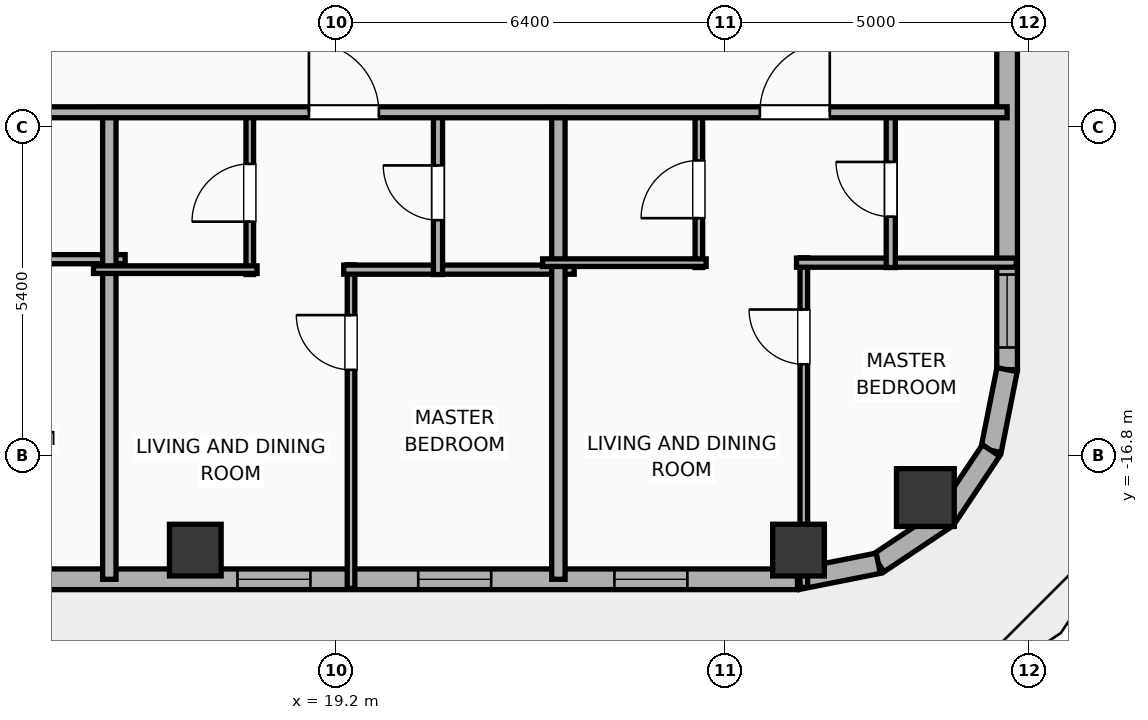
"""IFC4 building model, lengths in metres.
Left out: names, types, materials, properties, quantities, classifications, styles, units other than length and angle.
Written with IfcOpenShell. Run it as: python <this file> out.ifc"""

import sys

from ifc_helpers import new_model, si_unit, direction, frame, frame_2d, origin, origin_2d, place, context, subcontext, project, spatial, rectangle, hollow_rectangle, hollow_circle, extrude, element, fill, save


model = new_model("IFC4")
c1 = context("Model", 3, precision=1e-05, world=origin(), true_north=direction((0.0, 1.0)))
c2 = subcontext(c1, "Body", "Model", "MODEL_VIEW")
j1 = project(units=[si_unit("LENGTHUNIT", "METRE"), si_unit("PLANEANGLEUNIT", "RADIAN")], contexts=[c1])
p1 = place(None, origin())
s1 = spatial("IfcSite", under=j1, at=p1, CompositionType="ELEMENT")
p2 = place(p1, origin())
s2 = spatial("IfcBuilding", under=s1, at=p2, CompositionType="ELEMENT")
p3 = place(p2, frame((0.0, 0.0, 231.4)))
s3 = spatial("IfcBuildingStorey", under=s2, at=p3, CompositionType="ELEMENT", Elevation=231.4)
for number, where, z_axis, x_axis in (
    (1, (16.88, -18.35, 0.0), (0.0, 0.0, 1.0), (1.0, 0.0, 0.0)),
    (2, (26.8, -18.35, 0.0), (0.0, 0.0, 1.0), (1.0, 0.0, 0.0)),
):
    element("IfcColumn", number, at=place(p3, frame(where, z_axis=z_axis, x_axis=x_axis)), inside=s3, PredefinedType="COLUMN", context=c2, shape_type="SweptSolid", body=[
        extrude(hollow_rectangle(XDim=0.85, YDim=0.85, WallThickness=0.028, at=origin_2d()), origin(), (0.0, 0.0, 1.0), 3.9),
    ])
p4 = place(p3, frame((28.886, -17.486, 0.0), z_axis=(0.0, 0.0, 1.0), x_axis=(1.0, 0.0, 0.0)))
e3 = element("IfcColumn", 3, at=p4, inside=s3, PredefinedType="COLUMN", context=c2, shape_type="SweptSolid", body=[
    extrude(hollow_circle(Radius=0.475, WallThickness=0.032, at=origin_2d()), origin(), (0.0, 0.0, 1.0), 3.9),
])
p5 = place(p3, frame((26.783, -18.83, 0.0), z_axis=(0.0, 0.0, 1.0), x_axis=(-1.0, 0.0, 0.0)))
e4 = element("IfcWall", 4, at=p5, inside=s3, PredefinedType="ELEMENTEDWALL", context=c2, shape_type="SweptSolid", body=[
    extrude(rectangle(XDim=49.566, YDim=0.34, at=frame_2d((24.783, 0.0))), origin(), (0.0, 0.0, 1.0), 3.65),
])
p6 = place(p5, frame((23.583, 0.0, 0.75)))
e5 = element("IfcOpeningElement", 5, at=p6, cuts=e4, PredefinedType="OPENING", context=c2, shape_type="SweptSolid", body=[
    extrude(rectangle(XDim=2.4, YDim=2.1, at=frame_2d((1.2, 1.05))), frame((0.0, 0.18, 0.0), z_axis=(0.0, -1.0, 0.0), x_axis=(1.0, 0.0, 0.0)), (0.0, 0.0, 1.0), 0.36),
])
p7 = place(p5, frame((41.756, 0.0, 0.75)))
e6 = element("IfcOpeningElement", 6, at=p7, cuts=e4, PredefinedType="OPENING", context=c2, shape_type="SweptSolid", body=[
    extrude(rectangle(XDim=2.4, YDim=2.1, at=frame_2d((1.2, 1.05))), frame((0.0, 0.18, 0.0), z_axis=(0.0, -1.0, 0.0), x_axis=(1.0, 0.0, 0.0)), (0.0, 0.0, 1.0), 0.36),
])
p8 = place(p5, frame((47.222, 0.0, 0.75)))
e7 = element("IfcOpeningElement", 7, at=p8, cuts=e4, PredefinedType="OPENING", context=c2, shape_type="SweptSolid", body=[
    extrude(rectangle(XDim=1.2, YDim=2.05, at=frame_2d((0.6, 1.025))), frame((0.0, 0.18, 0.0), z_axis=(0.0, -1.0, 0.0), x_axis=(1.0, 0.0, 0.0)), (0.0, 0.0, 1.0), 0.36),
])
p9 = place(p5, frame((45.263, 0.0, 0.75)))
e8 = element("IfcOpeningElement", 8, at=p9, cuts=e4, PredefinedType="OPENING", context=c2, shape_type="SweptSolid", body=[
    extrude(rectangle(XDim=1.2, YDim=2.05, at=frame_2d((0.6, 1.025))), frame((0.0, 0.18, 0.0), z_axis=(0.0, -1.0, 0.0), x_axis=(1.0, 0.0, 0.0)), (0.0, 0.0, 1.0), 0.36),
])
p10 = place(p5, frame((37.289, 0.0, 0.75)))
e9 = element("IfcOpeningElement", 9, at=p10, cuts=e4, PredefinedType="OPENING", context=c2, shape_type="SweptSolid", body=[
    extrude(rectangle(XDim=1.2, YDim=2.05, at=frame_2d((0.6, 1.025))), frame((0.0, 0.18, 0.0), z_axis=(0.0, -1.0, 0.0), x_axis=(1.0, 0.0, 0.0)), (0.0, 0.0, 1.0), 0.36),
])
p11 = place(p5, frame((16.115, 0.0, 0.75)))
e10 = element("IfcOpeningElement", 10, at=p11, cuts=e4, PredefinedType="OPENING", context=c2, shape_type="SweptSolid", body=[
    extrude(rectangle(XDim=1.2, YDim=2.05, at=frame_2d((0.6, 1.025))), frame((0.0, 0.18, 0.0), z_axis=(0.0, -1.0, 0.0), x_axis=(1.0, 0.0, 0.0)), (0.0, 0.0, 1.0), 0.36),
])
p12 = place(p5, frame((12.422, 0.0, 0.75)))
e11 = element("IfcOpeningElement", 11, at=p12, cuts=e4, PredefinedType="OPENING", context=c2, shape_type="SweptSolid", body=[
    extrude(rectangle(XDim=1.2, YDim=2.05, at=frame_2d((0.6, 1.025))), frame((0.0, 0.18, 0.0), z_axis=(0.0, -1.0, 0.0), x_axis=(1.0, 0.0, 0.0)), (0.0, 0.0, 1.0), 0.36),
])
p13 = place(p5, frame((8.01, 0.0, 0.75)))
e12 = element("IfcOpeningElement", 12, at=p13, cuts=e4, PredefinedType="OPENING", context=c2, shape_type="SweptSolid", body=[
    extrude(rectangle(XDim=1.2, YDim=2.05, at=frame_2d((0.6, 1.025))), frame((0.0, 0.18, 0.0), z_axis=(0.0, -1.0, 0.0), x_axis=(1.0, 0.0, 0.0)), (0.0, 0.0, 1.0), 0.36),
])
p14 = place(p5, frame((5.037, 0.0, 0.75)))
e13 = element("IfcOpeningElement", 13, at=p14, cuts=e4, PredefinedType="OPENING", context=c2, shape_type="SweptSolid", body=[
    extrude(rectangle(XDim=1.2, YDim=2.05, at=frame_2d((0.6, 1.025))), frame((0.0, 0.18, 0.0), z_axis=(0.0, -1.0, 0.0), x_axis=(1.0, 0.0, 0.0)), (0.0, 0.0, 1.0), 0.36),
])
p15 = place(p5, frame((1.811, 0.0, 0.75)))
e14 = element("IfcOpeningElement", 14, at=p15, cuts=e4, PredefinedType="OPENING", context=c2, shape_type="SweptSolid", body=[
    extrude(rectangle(XDim=1.2, YDim=2.05, at=frame_2d((0.6, 1.025))), frame((0.0, 0.18, 0.0), z_axis=(0.0, -1.0, 0.0), x_axis=(1.0, 0.0, 0.0)), (0.0, 0.0, 1.0), 0.36),
])
p16 = place(p5, frame((32.253, 0.0, 0.75)))
e15 = element("IfcOpeningElement", 15, at=p16, cuts=e4, PredefinedType="OPENING", context=c2, shape_type="SweptSolid", body=[
    extrude(rectangle(XDim=1.2, YDim=2.05, at=frame_2d((0.6, 1.025))), frame((0.0, 0.18, 0.0), z_axis=(0.0, -1.0, 0.0), x_axis=(1.0, 0.0, 0.0)), (0.0, 0.0, 1.0), 0.36),
])
p17 = place(p5, frame((27.853, 0.0, 0.75)))
e16 = element("IfcOpeningElement", 16, at=p17, cuts=e4, PredefinedType="OPENING", context=c2, shape_type="SweptSolid", body=[
    extrude(rectangle(XDim=1.2, YDim=2.05, at=frame_2d((0.6, 1.025))), frame((0.0, 0.18, 0.0), z_axis=(0.0, -1.0, 0.0), x_axis=(1.0, 0.0, 0.0)), (0.0, 0.0, 1.0), 0.36),
])
p18 = place(p5, frame((20.473, 0.0, 0.75)))
e17 = element("IfcOpeningElement", 17, at=p18, cuts=e4, PredefinedType="OPENING", context=c2, shape_type="SweptSolid", body=[
    extrude(rectangle(XDim=1.2, YDim=2.05, at=frame_2d((0.6, 1.025))), frame((0.0, 0.18, 0.0), z_axis=(0.0, -1.0, 0.0), x_axis=(1.0, 0.0, 0.0)), (0.0, 0.0, 1.0), 0.36),
])
p19 = place(p3, frame((30.23, 16.583, 0.0), z_axis=(0.0, 0.0, 1.0), x_axis=(0.0, -1.0, 0.0)))
e18 = element("IfcWall", 18, at=p19, inside=s3, PredefinedType="ELEMENTEDWALL", context=c2, shape_type="SweptSolid", body=[
    extrude(rectangle(XDim=31.967, YDim=0.34, at=frame_2d((15.983, 0.0))), origin(), (0.0, 0.0, 1.0), 3.65),
])
p20 = place(p19, frame((23.925, 0.0, 0.75)))
e19 = element("IfcOpeningElement", 19, at=p20, cuts=e18, PredefinedType="OPENING", context=c2, shape_type="SweptSolid", body=[
    extrude(rectangle(XDim=1.8, YDim=2.1, at=frame_2d((0.9, 1.05))), frame((0.0, 0.18, 0.0), z_axis=(0.0, -1.0, 0.0), x_axis=(1.0, 0.0, 0.0)), (0.0, 0.0, 1.0), 0.36),
])
p21 = place(p19, frame((30.402, 0.0, 0.75)))
e20 = element("IfcOpeningElement", 20, at=p21, cuts=e18, PredefinedType="OPENING", context=c2, shape_type="SweptSolid", body=[
    extrude(rectangle(XDim=1.2, YDim=2.05, at=frame_2d((0.6, 1.025))), frame((0.0, 0.18, 0.0), z_axis=(0.0, -1.0, 0.0), x_axis=(1.0, 0.0, 0.0)), (0.0, 0.0, 1.0), 0.36),
])
p22 = place(p19, frame((11.113, 0.0, 0.75)))
e21 = element("IfcOpeningElement", 21, at=p22, cuts=e18, PredefinedType="OPENING", context=c2, shape_type="SweptSolid", body=[
    extrude(rectangle(XDim=1.2, YDim=2.05, at=frame_2d((0.6, 1.025))), frame((0.0, 0.18, 0.0), z_axis=(0.0, -1.0, 0.0), x_axis=(1.0, 0.0, 0.0)), (0.0, 0.0, 1.0), 0.36),
])
p23 = place(p3, frame((30.23, -15.383, 0.0), z_axis=(0.0, 0.0, 1.0), x_axis=(-0.195110379894, -0.98078129043, 0.0)))
e22 = element("IfcWall", 22, at=p23, inside=s3, PredefinedType="ELEMENTEDWALL", context=c2, shape_type="SweptSolid", body=[
    extrude(rectangle(XDim=1.354, YDim=0.34, at=frame_2d((0.677, 0.0))), origin(), (0.0, 0.0, 1.0), 3.65),
])
p24 = place(p3, frame((29.966, -16.711, 0.0), z_axis=(0.0, 0.0, 1.0), x_axis=(-0.555584683399, -0.831459956686, 0.0)))
e23 = element("IfcWall", 23, at=p24, inside=s3, PredefinedType="ELEMENTEDWALL", context=c2, shape_type="SweptSolid", body=[
    extrude(rectangle(XDim=1.337, YDim=0.34, at=frame_2d((0.668, 0.0))), origin(), (0.0, 0.0, 1.0), 3.65),
])
p25 = place(p3, frame((29.223, -17.823, 0.0), z_axis=(0.0, 0.0, 1.0), x_axis=(-0.831403586725, -0.555669034571, 0.0)))
e24 = element("IfcWall", 24, at=p25, inside=s3, PredefinedType="ELEMENTEDWALL", context=c2, shape_type="SweptSolid", body=[
    extrude(rectangle(XDim=1.337, YDim=0.34, at=frame_2d((0.668, 0.0))), origin(), (0.0, 0.0, 1.0), 3.65),
])
p26 = place(p3, frame((28.111, -18.566, 0.0), z_axis=(0.0, 0.0, 1.0), x_axis=(-0.980788153188, -0.195075878998, 0.0)))
e25 = element("IfcWall", 25, at=p26, inside=s3, PredefinedType="ELEMENTEDWALL", context=c2, shape_type="SweptSolid", body=[
    extrude(rectangle(XDim=1.354, YDim=0.34, at=frame_2d((0.677, 0.0))), origin(), (0.0, 0.0, 1.0), 3.65),
])
p27 = place(p3, frame((11.936, -13.566, 0.0), z_axis=(0.0, 0.0, 1.0), x_axis=(1.0, 0.0, 0.0)))
e26 = element("IfcWall", 26, at=p27, inside=s3, PredefinedType="PLUMBINGWALL", context=c2, shape_type="SweptSolid", body=[
    extrude(rectangle(XDim=3.79, YDim=0.15, at=frame_2d((1.895, 0.0))), origin(), (0.0, 0.0, 1.0), 3.65),
])
p28 = place(p3, frame((15.466, -18.83, 0.0), z_axis=(0.0, 0.0, 1.0), x_axis=(0.0, 1.0, 0.0)))
e27 = element("IfcWall", 27, at=p28, inside=s3, PredefinedType="PARTITIONING", context=c2, shape_type="SweptSolid", body=[
    extrude(rectangle(XDim=7.76, YDim=0.22, at=frame_2d((3.88, 0.0))), origin(), (0.0, 0.0, 1.0), 3.65),
])
p29 = place(p3, frame((19.441, -18.98, 0.0), z_axis=(0.0, 0.0, 1.0), x_axis=(0.0, 1.0, 0.0)))
e28 = element("IfcWall", 28, at=p29, inside=s3, PredefinedType="PARTITIONING", context=c2, shape_type="SweptSolid", body=[
    extrude(rectangle(XDim=5.322, YDim=0.125, at=frame_2d((2.661, 0.0))), origin(), (0.0, 0.0, 1.0), 3.65),
])
p30 = place(p29, frame((3.595, 0.0, 0.0)))
e29 = element("IfcOpeningElement", 29, at=p30, cuts=e28, PredefinedType="OPENING", context=c2, shape_type="SweptSolid", body=[
    extrude(rectangle(XDim=0.9, YDim=2.05, at=frame_2d((0.45, 1.025))), frame((0.0, 0.073, 0.0), z_axis=(0.0, -1.0, 0.0), x_axis=(1.0, 0.0, 0.0)), (0.0, 0.0, 1.0), 0.145),
])
p31 = place(p3, frame((19.321, -13.738, 0.0), z_axis=(0.0, 0.0, 1.0), x_axis=(1.0, 0.0, 0.0)))
e30 = element("IfcWall", 30, at=p31, inside=s3, PredefinedType="PLUMBINGWALL", context=c2, shape_type="SweptSolid", body=[
    extrude(rectangle(XDim=3.79, YDim=0.15, at=frame_2d((1.895, 0.0))), origin(), (0.0, 0.0, 1.0), 3.65),
])
p32 = place(p3, frame((17.776, -13.818, 0.0), z_axis=(0.0, 0.0, 1.0), x_axis=(0.0, 1.0, 0.0)))
e31 = element("IfcWall", 31, at=p32, inside=s3, PredefinedType="PARTITIONING", context=c2, shape_type="SweptSolid", body=[
    extrude(rectangle(XDim=2.688, YDim=0.125, at=frame_2d((1.344, 0.0))), origin(), (0.0, 0.0, 1.0), 3.65),
])
p33 = place(p32, frame((0.869, 0.0, 0.0)))
e32 = element("IfcOpeningElement", 32, at=p33, cuts=e31, PredefinedType="OPENING", context=c2, shape_type="SweptSolid", body=[
    extrude(rectangle(XDim=0.95, YDim=2.05, at=frame_2d((0.475, 1.025))), frame((0.0, 0.073, 0.0), z_axis=(0.0, -1.0, 0.0), x_axis=(1.0, 0.0, 0.0)), (0.0, 0.0, 1.0), 0.145),
])
p34 = place(p3, frame((15.206, -13.738, 0.0), z_axis=(0.0, 0.0, 1.0), x_axis=(1.0, 0.0, 0.0)))
e33 = element("IfcWall", 33, at=p34, inside=s3, PredefinedType="PARTITIONING", context=c2, shape_type="SweptSolid", body=[
    extrude(rectangle(XDim=2.69, YDim=0.125, at=frame_2d((1.345, 0.0))), origin(), (0.0, 0.0, 1.0), 3.65),
])
p35 = place(p3, frame((20.871, -13.818, 0.0), z_axis=(0.0, 0.0, 1.0), x_axis=(0.0, 1.0, 0.0)))
e34 = element("IfcWall", 34, at=p35, inside=s3, PredefinedType="PLUMBINGWALL", context=c2, shape_type="SweptSolid", body=[
    extrude(rectangle(XDim=2.688, YDim=0.15, at=frame_2d((1.344, 0.0))), origin(), (0.0, 0.0, 1.0), 3.65),
])
p36 = place(p35, frame((0.894, 0.0, 0.0)))
e35 = element("IfcOpeningElement", 35, at=p36, cuts=e34, PredefinedType="OPENING", context=c2, shape_type="SweptSolid", body=[
    extrude(rectangle(XDim=0.9, YDim=2.05, at=frame_2d((0.45, 1.025))), frame((0.0, 0.085, 0.0), z_axis=(0.0, -1.0, 0.0), x_axis=(1.0, 0.0, 0.0)), (0.0, 0.0, 1.0), 0.17),
])
p37 = place(p3, frame((22.851, -18.83, 0.0), z_axis=(0.0, 0.0, 1.0), x_axis=(0.0, 1.0, 0.0)))
e36 = element("IfcWall", 36, at=p37, inside=s3, PredefinedType="PARTITIONING", context=c2, shape_type="SweptSolid", body=[
    extrude(rectangle(XDim=7.76, YDim=0.22, at=frame_2d((3.88, 0.0))), origin(), (0.0, 0.0, 1.0), 3.65),
])
p38 = place(p3, frame((26.887, -18.962, 0.0), z_axis=(0.0, 0.0, 1.0), x_axis=(0.0, 1.0, 0.0)))
e37 = element("IfcWall", 37, at=p38, inside=s3, PredefinedType="PARTITIONING", context=c2, shape_type="SweptSolid", body=[
    extrude(rectangle(XDim=5.419, YDim=0.125, at=frame_2d((2.71, 0.0))), origin(), (0.0, 0.0, 1.0), 3.65),
])
p39 = place(p38, frame((3.669, 0.0, 0.0)))
e38 = element("IfcOpeningElement", 38, at=p39, cuts=e37, PredefinedType="OPENING", context=c2, shape_type="SweptSolid", body=[
    extrude(rectangle(XDim=0.9, YDim=2.05, at=frame_2d((0.45, 1.025))), frame((0.0, 0.073, 0.0), z_axis=(0.0, -1.0, 0.0), x_axis=(1.0, 0.0, 0.0)), (0.0, 0.0, 1.0), 0.145),
])
p40 = place(p3, frame((26.767, -13.623, 0.0), z_axis=(0.0, 0.0, 1.0), x_axis=(1.0, 0.0, 0.0)))
e39 = element("IfcWall", 39, at=p40, inside=s3, PredefinedType="PLUMBINGWALL", context=c2, shape_type="SweptSolid", body=[
    extrude(rectangle(XDim=3.613, YDim=0.15, at=frame_2d((1.806, 0.0))), origin(), (0.0, 0.0, 1.0), 3.65),
])
p41 = place(p3, frame((25.161, -13.703, 0.0), z_axis=(0.0, 0.0, 1.0), x_axis=(0.0, 1.0, 0.0)))
e40 = element("IfcWall", 40, at=p41, inside=s3, PredefinedType="PARTITIONING", context=c2, shape_type="SweptSolid", body=[
    extrude(rectangle(XDim=2.573, YDim=0.125, at=frame_2d((1.287, 0.0))), origin(), (0.0, 0.0, 1.0), 3.65),
])
p42 = place(p41, frame((0.812, 0.0, 0.0)))
e41 = element("IfcOpeningElement", 41, at=p42, cuts=e40, PredefinedType="OPENING", context=c2, shape_type="SweptSolid", body=[
    extrude(rectangle(XDim=0.95, YDim=2.05, at=frame_2d((0.475, 1.025))), frame((0.0, 0.073, 0.0), z_axis=(0.0, -1.0, 0.0), x_axis=(1.0, 0.0, 0.0)), (0.0, 0.0, 1.0), 0.145),
])
p43 = place(p3, frame((22.591, -13.623, 0.0), z_axis=(0.0, 0.0, 1.0), x_axis=(1.0, 0.0, 0.0)))
e42 = element("IfcWall", 42, at=p43, inside=s3, PredefinedType="PARTITIONING", context=c2, shape_type="SweptSolid", body=[
    extrude(rectangle(XDim=2.69, YDim=0.125, at=frame_2d((1.345, 0.0))), origin(), (0.0, 0.0, 1.0), 3.65),
])
p44 = place(p3, frame((28.317, -13.703, 0.0), z_axis=(0.0, 0.0, 1.0), x_axis=(0.0, 1.0, 0.0)))
e43 = element("IfcWall", 43, at=p44, inside=s3, PredefinedType="PLUMBINGWALL", context=c2, shape_type="SweptSolid", body=[
    extrude(rectangle(XDim=2.573, YDim=0.15, at=frame_2d((1.287, 0.0))), origin(), (0.0, 0.0, 1.0), 3.65),
])
p45 = place(p44, frame((0.836, 0.0, 0.0)))
e44 = element("IfcOpeningElement", 44, at=p45, cuts=e43, PredefinedType="OPENING", context=c2, shape_type="SweptSolid", body=[
    extrude(rectangle(XDim=0.9, YDim=2.05, at=frame_2d((0.45, 1.025))), frame((0.0, 0.085, 0.0), z_axis=(0.0, -1.0, 0.0), x_axis=(1.0, 0.0, 0.0)), (0.0, 0.0, 1.0), 0.17),
])
p46 = place(p3, frame((8.08, -11.15, 0.0), z_axis=(0.0, 0.0, 1.0), x_axis=(1.0, 0.0, 0.0)))
e45 = element("IfcWall", 45, at=p46, inside=s3, PredefinedType="PARTITIONING", context=c2, shape_type="SweptSolid", body=[
    extrude(rectangle(XDim=22.15, YDim=0.18, at=frame_2d((11.075, 0.0))), origin(), (0.0, 0.0, 1.0), 3.65),
])
p47 = place(p46, frame((3.283, 0.0, 0.0)))
e46 = element("IfcOpeningElement", 46, at=p47, cuts=e45, PredefinedType="OPENING", context=c2, shape_type="SweptSolid", body=[
    extrude(rectangle(XDim=1.15, YDim=2.05, at=frame_2d((0.575, 1.025))), frame((0.0, 0.1, 0.0), z_axis=(0.0, -1.0, 0.0), x_axis=(1.0, 0.0, 0.0)), (0.0, 0.0, 1.0), 0.2),
])
p48 = place(p46, frame((10.668, 0.0, 0.0)))
e47 = element("IfcOpeningElement", 47, at=p48, cuts=e45, PredefinedType="OPENING", context=c2, shape_type="SweptSolid", body=[
    extrude(rectangle(XDim=1.15, YDim=2.05, at=frame_2d((0.575, 1.025))), frame((0.0, 0.1, 0.0), z_axis=(0.0, -1.0, 0.0), x_axis=(1.0, 0.0, 0.0)), (0.0, 0.0, 1.0), 0.2),
])
p49 = place(p46, frame((18.084, 0.0, 0.0)))
e48 = element("IfcOpeningElement", 48, at=p49, cuts=e45, PredefinedType="OPENING", context=c2, shape_type="SweptSolid", body=[
    extrude(rectangle(XDim=1.15, YDim=2.05, at=frame_2d((0.575, 1.025))), frame((0.0, 0.1, 0.0), z_axis=(0.0, -1.0, 0.0), x_axis=(1.0, 0.0, 0.0)), (0.0, 0.0, 1.0), 0.2),
])
p50 = place(p13, origin())
e49 = element("IfcWindow", 49, at=p50, inside=s3, PartitioningType="SINGLE_PANEL", PredefinedType="WINDOW", context=c2, shape_type="SweptSolid", body=[
    extrude(rectangle(XDim=1.2, YDim=2.05, at=frame_2d((0.6, 1.025))), frame((0.0, 0.03, 0.0), z_axis=(0.0, -1.0, 0.0), x_axis=(1.0, 0.0, 0.0)), (0.0, 0.0, 1.0), 0.06),
])
fill(e12, e49)
p51 = place(p14, origin())
e50 = element("IfcWindow", 50, at=p51, inside=s3, PartitioningType="SINGLE_PANEL", PredefinedType="WINDOW", context=c2, shape_type="SweptSolid", body=[
    extrude(rectangle(XDim=1.2, YDim=2.05, at=frame_2d((0.6, 1.025))), frame((0.0, 0.03, 0.0), z_axis=(0.0, -1.0, 0.0), x_axis=(1.0, 0.0, 0.0)), (0.0, 0.0, 1.0), 0.06),
])
fill(e13, e50)
p52 = place(p15, origin())
e51 = element("IfcWindow", 51, at=p52, inside=s3, PartitioningType="SINGLE_PANEL", PredefinedType="WINDOW", context=c2, shape_type="SweptSolid", body=[
    extrude(rectangle(XDim=1.2, YDim=2.05, at=frame_2d((0.6, 1.025))), frame((0.0, 0.03, 0.0), z_axis=(0.0, -1.0, 0.0), x_axis=(1.0, 0.0, 0.0)), (0.0, 0.0, 1.0), 0.06),
])
fill(e14, e51)
p53 = place(p21, origin())
e52 = element("IfcWindow", 52, at=p53, inside=s3, PartitioningType="SINGLE_PANEL", PredefinedType="WINDOW", context=c2, shape_type="SweptSolid", body=[
    extrude(rectangle(XDim=1.2, YDim=2.05, at=frame_2d((0.6, 1.025))), frame((0.0, 0.03, 0.0), z_axis=(0.0, -1.0, 0.0), x_axis=(1.0, 0.0, 0.0)), (0.0, 0.0, 1.0), 0.06),
])
fill(e20, e52)
p54 = place(p30, origin())
e53 = element("IfcDoor", 53, at=p54, inside=s3, OperationType="SINGLE_SWING_RIGHT", PredefinedType="DOOR", context=c2, shape_type="SweptSolid", body=[
    extrude(rectangle(XDim=0.9, YDim=2.05, at=frame_2d((0.45, 1.025))), frame((0.0, 0.025, 0.0), z_axis=(0.0, -1.0, 0.0), x_axis=(1.0, 0.0, 0.0)), (0.0, 0.0, 1.0), 0.05),
])
fill(e29, e53)
p55 = place(p33, origin())
e54 = element("IfcDoor", 54, at=p55, inside=s3, OperationType="SINGLE_SWING_LEFT", PredefinedType="DOOR", context=c2, shape_type="SweptSolid", body=[
    extrude(rectangle(XDim=0.95, YDim=2.05, at=frame_2d((0.475, 1.025))), frame((0.0, 0.025, 0.0), z_axis=(0.0, -1.0, 0.0), x_axis=(1.0, 0.0, 0.0)), (0.0, 0.0, 1.0), 0.05),
])
fill(e32, e54)
p56 = place(p36, origin())
e55 = element("IfcDoor", 55, at=p56, inside=s3, OperationType="SINGLE_SWING_RIGHT", PredefinedType="DOOR", context=c2, shape_type="SweptSolid", body=[
    extrude(rectangle(XDim=0.9, YDim=2.05, at=frame_2d((0.45, 1.025))), frame((0.0, 0.025, 0.0), z_axis=(0.0, -1.0, 0.0), x_axis=(1.0, 0.0, 0.0)), (0.0, 0.0, 1.0), 0.05),
])
fill(e35, e55)
p57 = place(p39, origin())
e56 = element("IfcDoor", 56, at=p57, inside=s3, OperationType="SINGLE_SWING_RIGHT", PredefinedType="DOOR", context=c2, shape_type="SweptSolid", body=[
    extrude(rectangle(XDim=0.9, YDim=2.05, at=frame_2d((0.45, 1.025))), frame((0.0, 0.025, 0.0), z_axis=(0.0, -1.0, 0.0), x_axis=(1.0, 0.0, 0.0)), (0.0, 0.0, 1.0), 0.05),
])
fill(e38, e56)
p58 = place(p42, origin())
e57 = element("IfcDoor", 57, at=p58, inside=s3, OperationType="SINGLE_SWING_LEFT", PredefinedType="DOOR", context=c2, shape_type="SweptSolid", body=[
    extrude(rectangle(XDim=0.95, YDim=2.05, at=frame_2d((0.475, 1.025))), frame((0.0, 0.025, 0.0), z_axis=(0.0, -1.0, 0.0), x_axis=(1.0, 0.0, 0.0)), (0.0, 0.0, 1.0), 0.05),
])
fill(e41, e57)
p59 = place(p45, origin())
e58 = element("IfcDoor", 58, at=p59, inside=s3, OperationType="SINGLE_SWING_RIGHT", PredefinedType="DOOR", context=c2, shape_type="SweptSolid", body=[
    extrude(rectangle(XDim=0.9, YDim=2.05, at=frame_2d((0.45, 1.025))), frame((0.0, 0.025, 0.0), z_axis=(0.0, -1.0, 0.0), x_axis=(1.0, 0.0, 0.0)), (0.0, 0.0, 1.0), 0.05),
])
fill(e44, e58)
p60 = place(p48, origin())
e59 = element("IfcDoor", 59, at=p60, inside=s3, OperationType="SINGLE_SWING_LEFT", PredefinedType="DOOR", context=c2, shape_type="SweptSolid", body=[
    extrude(rectangle(XDim=1.15, YDim=2.05, at=frame_2d((0.575, 1.025))), frame((0.0, 0.025, 0.0), z_axis=(0.0, -1.0, 0.0), x_axis=(1.0, 0.0, 0.0)), (0.0, 0.0, 1.0), 0.05),
])
fill(e47, e59)
p61 = place(p49, origin())
e60 = element("IfcDoor", 60, at=p61, inside=s3, OperationType="SINGLE_SWING_RIGHT", PredefinedType="DOOR", context=c2, shape_type="SweptSolid", body=[
    extrude(rectangle(XDim=1.15, YDim=2.05, at=frame_2d((0.575, 1.025))), frame((0.0, 0.025, 0.0), z_axis=(0.0, -1.0, 0.0), x_axis=(1.0, 0.0, 0.0)), (0.0, 0.0, 1.0), 0.05),
])
fill(e48, e60)
save(model, sys.argv[1])
